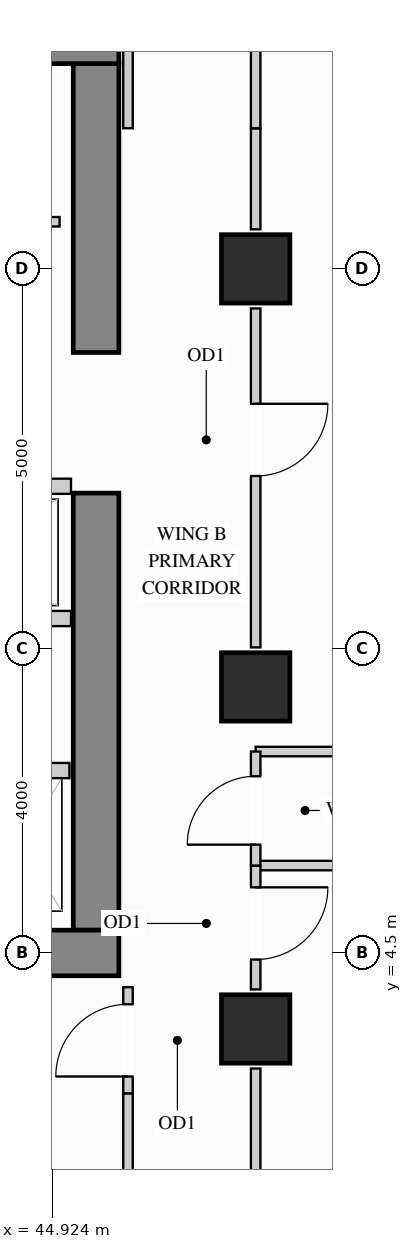
"""IFC4 building model, lengths in metres.
Left out: names, types, materials, properties, quantities, classifications, styles, units other than length and angle.
Written with IfcOpenShell. Run it as: python <this file> out.ifc"""

import sys

from ifc_helpers import new_model, si_unit, direction, frame, frame_2d, origin, origin_2d, place, context, subcontext, project, spatial, rectangle, extrude, source, transform, mapped, element, fill, save


model = new_model("IFC4")
c1 = context("Model", 3, precision=1e-05, world=origin(), true_north=direction((0.0, 1.0)))
c2 = subcontext(c1, "Body", "Model", "MODEL_VIEW")
j1 = project(units=[si_unit("LENGTHUNIT", "METRE"), si_unit("PLANEANGLEUNIT", "RADIAN")], contexts=[c1])
p1 = place(None, origin())
s1 = spatial("IfcSite", under=j1, at=p1, CompositionType="ELEMENT")
p2 = place(p1, origin())
s2 = spatial("IfcBuilding", under=s1, at=p2, CompositionType="ELEMENT")
p3 = place(p2, frame((0.0, 0.0, 150.3)))
s3 = spatial("IfcBuildingStorey", under=s2, at=p3, CompositionType="ELEMENT", Elevation=150.3)
m1 = source(origin(), c2, "Body", "SweptSolid", [
    extrude(rectangle(XDim=0.9, YDim=0.9, at=origin_2d()), origin(), (0.0, 0.0, 1.0), 3.4),
])
for number, where, z_axis, x_axis in (
    (1, (47.6, 13.5, 0.0), (0.0, 0.0, 1.0), (1.0, 0.0, 0.0)),
    (2, (47.6, 3.5, 0.0), (0.0, 0.0, 1.0), (1.0, 0.0, 0.0)),
    (3, (47.6, 8.0, 0.0), (0.0, 0.0, 1.0), (1.0, 0.0, 0.0)),
):
    element("IfcColumn", number, at=place(p3, frame(where, z_axis=z_axis, x_axis=x_axis)), inside=s3, PredefinedType="COLUMN", context=c2, shape_type="MappedRepresentation", body=[
        mapped(m1, transform((0.0, 0.0, 0.0), x_axis=(1.0, 0.0, 0.0), y_axis=(0.0, 1.0, 0.0), z_axis=(0.0, 0.0, 1.0))),
    ])
m2 = source(origin(), c2, "Body", "SweptSolid", [
    extrude(rectangle(XDim=5.75, YDim=0.6, at=frame_2d((2.875, 0.0))), origin(), (0.0, 0.0, 1.0), 3.4),
])
p4 = place(p3, frame((45.5, 4.8, 0.0), z_axis=(0.0, 0.0, 1.0), x_axis=(0.0, 1.0, 0.0)))
e4 = element("IfcWall", 4, at=p4, inside=s3, PredefinedType="SHEAR", context=c2, shape_type="MappedRepresentation", body=[
    mapped(m2, transform((0.0, 0.0, 0.0), x_axis=(1.0, 0.0, 0.0), y_axis=(0.0, 1.0, 0.0), z_axis=(0.0, 0.0, 1.0))),
])
m3 = source(origin(), c2, "Body", "SweptSolid", [
    extrude(rectangle(XDim=3.8, YDim=0.6, at=frame_2d((1.9, 0.0))), origin(), (0.0, 0.0, 1.0), 3.4),
])
p5 = place(p3, frame((45.5, 12.4, 0.0), z_axis=(0.0, 0.0, 1.0), x_axis=(0.0, 1.0, 0.0)))
e5 = element("IfcWall", 5, at=p5, inside=s3, PredefinedType="SHEAR", context=c2, shape_type="MappedRepresentation", body=[
    mapped(m3, transform((0.0, 0.0, 0.0), x_axis=(1.0, 0.0, 0.0), y_axis=(0.0, 1.0, 0.0), z_axis=(0.0, 0.0, 1.0))),
])
m4 = source(origin(), c2, "Body", "SweptSolid", [
    extrude(rectangle(XDim=10.1, YDim=0.6, at=frame_2d((5.05, 0.0))), origin(), (0.0, 0.0, 1.0), 3.4),
])
for number, where, z_axis, x_axis in (
    (6, (35.7, 16.5, 0.0), (0.0, 0.0, 1.0), (1.0, 0.0, 0.0)),
    (7, (35.7, 4.5, 0.0), (0.0, 0.0, 1.0), (1.0, 0.0, 0.0)),
):
    element("IfcWall", number, at=place(p3, frame(where, z_axis=z_axis, x_axis=x_axis)), inside=s3, PredefinedType="SHEAR", context=c2, shape_type="MappedRepresentation", body=[
        mapped(m4, transform((0.0, 0.0, 0.0), x_axis=(1.0, 0.0, 0.0), y_axis=(0.0, 1.0, 0.0), z_axis=(0.0, 0.0, 1.0))),
    ])
p6 = place(p3, frame((40.75, 14.12, 0.0), z_axis=(0.0, 0.0, 1.0), x_axis=(1.0, 0.0, 0.0)))
e8 = element("IfcWall", 8, at=p6, inside=s3, PredefinedType="PARTITIONING", context=c2, shape_type="SweptSolid", body=[
    extrude(rectangle(XDim=4.27, YDim=0.125, at=frame_2d((2.135, 0.0))), origin(), (0.0, 0.0, 1.0), 3.385),
])
p7 = place(p6, frame((1.66, 0.0, 0.0)))
e9 = element("IfcOpeningElement", 9, at=p7, cuts=e8, PredefinedType="OPENING", context=c2, shape_type="SweptSolid", body=[
    extrude(rectangle(XDim=0.95, YDim=2.15, at=frame_2d((0.475, 1.075))), frame((0.0, 0.073, 0.0), z_axis=(0.0, -1.0, 0.0), x_axis=(1.0, 0.0, 0.0)), (0.0, 0.0, 1.0), 0.145),
])
m5 = source(origin(), c2, "Body", "SweptSolid", [
    extrude(rectangle(XDim=5.048, YDim=0.125, at=frame_2d((2.524, 0.0))), origin(), (0.0, 0.0, 1.0), 3.385),
])
for number, where, z_axis, x_axis in (
    (10, (47.6, 5.65, 0.0), (0.0, 0.0, 1.0), (1.0, 0.0, 0.0)),
    (11, (47.6, 7.15, 0.0), (0.0, 0.0, 1.0), (1.0, 0.0, 0.0)),
):
    element("IfcWall", number, at=place(p3, frame(where, z_axis=z_axis, x_axis=x_axis)), inside=s3, PredefinedType="PARTITIONING", context=c2, shape_type="MappedRepresentation", body=[
        mapped(m5, transform((0.0, 0.0, 0.0), x_axis=(1.0, 0.0, 0.0), y_axis=(0.0, 1.0, 0.0), z_axis=(0.0, 0.0, 1.0))),
    ])
p8 = place(p3, frame((47.6, 4.02, 0.0), z_axis=(0.0, 0.0, 1.0), x_axis=(0.0, 1.0, 0.0)))
e12 = element("IfcWall", 12, at=p8, inside=s3, PredefinedType="PARTITIONING", context=c2, shape_type="SweptSolid", body=[
    extrude(rectangle(XDim=1.63, YDim=0.125, at=frame_2d((0.815, 0.0))), origin(), (0.0, 0.0, 1.0), 2.773),
])
p9 = place(p8, frame((0.393, 0.0, 0.0)))
e13 = element("IfcOpeningElement", 13, at=p9, cuts=e12, PredefinedType="OPENING", context=c2, shape_type="SweptSolid", body=[
    extrude(rectangle(XDim=0.95, YDim=2.15, at=frame_2d((0.475, 1.075))), frame((0.0, 0.073, 0.0), z_axis=(0.0, -1.0, 0.0), x_axis=(1.0, 0.0, 0.0)), (0.0, 0.0, 1.0), 0.145),
])
m6 = source(origin(), c2, "Body", "SweptSolid", [
    extrude(rectangle(XDim=1.86, YDim=0.125, at=frame_2d((0.93, 0.0))), origin(), (0.0, 0.0, 1.0), 2.773),
])
p10 = place(p3, frame((47.6, 1.12, 0.0), z_axis=(0.0, 0.0, 1.0), x_axis=(0.0, 1.0, 0.0)))
e14 = element("IfcWall", 14, at=p10, inside=s3, PredefinedType="PARTITIONING", context=c2, shape_type="MappedRepresentation", body=[
    mapped(m6, transform((0.0, 0.0, 0.0), x_axis=(1.0, 0.0, 0.0), y_axis=(0.0, 1.0, 0.0), z_axis=(0.0, 0.0, 1.0))),
])
p11 = place(p3, frame((47.6, 8.52, 0.0), z_axis=(0.0, 0.0, 1.0), x_axis=(0.0, 1.0, 0.0)))
e15 = element("IfcWall", 15, at=p11, inside=s3, PredefinedType="PARTITIONING", context=c2, shape_type="SweptSolid", body=[
    extrude(rectangle(XDim=4.46, YDim=0.125, at=frame_2d((2.23, 0.0))), origin(), (0.0, 0.0, 1.0), 2.773),
])
p12 = place(p11, frame((2.255, 0.0, 0.0)))
e16 = element("IfcOpeningElement", 16, at=p12, cuts=e15, PredefinedType="OPENING", context=c2, shape_type="SweptSolid", body=[
    extrude(rectangle(XDim=0.95, YDim=2.15, at=frame_2d((0.475, 1.075))), frame((0.0, 0.073, 0.0), z_axis=(0.0, -1.0, 0.0), x_axis=(1.0, 0.0, 0.0)), (0.0, 0.0, 1.0), 0.145),
])
m7 = source(origin(), c2, "Body", "SweptSolid", [
    extrude(rectangle(XDim=1.33, YDim=0.125, at=frame_2d((0.665, 0.0))), origin(), (0.0, 0.0, 1.0), 2.773),
])
p13 = place(p3, frame((47.6, 14.02, 0.0), z_axis=(0.0, 0.0, 1.0), x_axis=(0.0, 1.0, 0.0)))
e17 = element("IfcWall", 17, at=p13, inside=s3, PredefinedType="PARTITIONING", context=c2, shape_type="MappedRepresentation", body=[
    mapped(m7, transform((0.0, 0.0, 0.0), x_axis=(1.0, 0.0, 0.0), y_axis=(0.0, 1.0, 0.0), z_axis=(0.0, 0.0, 1.0))),
])
m8 = source(origin(), c2, "Body", "SweptSolid", [
    extrude(rectangle(XDim=1.53, YDim=0.125, at=frame_2d((0.765, 0.0))), origin(), (0.0, 0.0, 1.0), 2.773),
])
p14 = place(p3, frame((47.6, 15.35, 0.0), z_axis=(0.0, 0.0, 1.0), x_axis=(0.0, 1.0, 0.0)))
e18 = element("IfcWall", 18, at=p14, inside=s3, PredefinedType="PARTITIONING", context=c2, shape_type="MappedRepresentation", body=[
    mapped(m8, transform((0.0, 0.0, 0.0), x_axis=(1.0, 0.0, 0.0), y_axis=(0.0, 1.0, 0.0), z_axis=(0.0, 0.0, 1.0))),
])
p15 = place(p3, frame((47.6, 5.65, 0.0), z_axis=(0.0, 0.0, 1.0), x_axis=(0.0, 1.0, 0.0)))
e19 = element("IfcWall", 19, at=p15, inside=s3, PredefinedType="PARTITIONING", context=c2, shape_type="SweptSolid", body=[
    extrude(rectangle(XDim=1.5, YDim=0.125, at=frame_2d((0.75, 0.0))), origin(), (0.0, 0.0, 1.0), 2.773),
])
p16 = place(p15, frame((0.275, 0.0, 0.0)))
e20 = element("IfcOpeningElement", 20, at=p16, cuts=e19, PredefinedType="OPENING", context=c2, shape_type="SweptSolid", body=[
    extrude(rectangle(XDim=0.9, YDim=2.15, at=frame_2d((0.45, 1.075))), frame((0.0, 0.073, 0.0), z_axis=(0.0, -1.0, 0.0), x_axis=(1.0, 0.0, 0.0)), (0.0, 0.0, 1.0), 0.145),
])
m9 = source(origin(), c2, "Body", "SweptSolid", [
    extrude(rectangle(XDim=2.298, YDim=0.125, at=frame_2d((1.149, 0.0))), origin(), (0.0, 0.0, 1.0), 3.385),
])
p17 = place(p3, frame((45.92, 15.35, 0.0), z_axis=(0.0, 0.0, 1.0), x_axis=(0.0, 1.0, 0.0)))
e21 = element("IfcWall", 21, at=p17, inside=s3, PredefinedType="PARTITIONING", context=c2, shape_type="MappedRepresentation", body=[
    mapped(m9, transform((0.0, 0.0, 0.0), x_axis=(1.0, 0.0, 0.0), y_axis=(0.0, 1.0, 0.0), z_axis=(0.0, 0.0, 1.0))),
])
p18 = place(p3, frame((45.92, 2.65, 0.0), z_axis=(0.0, 0.0, 1.0), x_axis=(0.0, 1.0, 0.0)))
e22 = element("IfcWall", 22, at=p18, inside=s3, PredefinedType="PARTITIONING", context=c2, shape_type="SweptSolid", body=[
    extrude(rectangle(XDim=1.4, YDim=0.125, at=frame_2d((0.7, 0.0))), origin(), (0.0, 0.0, 1.0), 3.385),
])
p19 = place(p18, frame((0.225, 0.0, 0.0)))
e23 = element("IfcOpeningElement", 23, at=p19, cuts=e22, PredefinedType="OPENING", context=c2, shape_type="SweptSolid", body=[
    extrude(rectangle(XDim=0.95, YDim=2.15, at=frame_2d((0.475, 1.075))), frame((0.0, 0.073, 0.0), z_axis=(0.0, -1.0, 0.0), x_axis=(1.0, 0.0, 0.0)), (0.0, 0.0, 1.0), 0.145),
])
p20 = place(p3, frame((45.92, 0.352, 0.0), z_axis=(0.0, 0.0, 1.0), x_axis=(0.0, 1.0, 0.0)))
e24 = element("IfcWall", 24, at=p20, inside=s3, PredefinedType="PARTITIONING", context=c2, shape_type="MappedRepresentation", body=[
    mapped(m9, transform((0.0, 0.0, 0.0), x_axis=(1.0, 0.0, 0.0), y_axis=(0.0, 1.0, 0.0), z_axis=(0.0, 0.0, 1.0))),
])
m10 = source(origin(), c2, "Body", "SweptSolid", [
    extrude(rectangle(XDim=1.3, YDim=0.2, at=frame_2d((0.65, 0.0))), origin(), (0.0, 0.0, 1.0), 3.385),
])
p21 = place(p3, frame((43.85, 6.9, 0.0), z_axis=(0.0, 0.0, 1.0), x_axis=(1.0, 0.0, 0.0)))
e25 = element("IfcWall", 25, at=p21, inside=s3, PredefinedType="PARTITIONING", context=c2, shape_type="MappedRepresentation", body=[
    mapped(m10, transform((0.0, 0.0, 0.0), x_axis=(1.0, 0.0, 0.0), y_axis=(0.0, 1.0, 0.0), z_axis=(0.0, 0.0, 1.0))),
])
m11 = source(origin(), c2, "Body", "SweptSolid", [
    extrude(rectangle(XDim=3.49, YDim=0.2, at=frame_2d((1.745, 0.0))), origin(), (0.0, 0.0, 1.0), 3.385),
])
for number, where, z_axis, x_axis in (
    (26, (41.68, 10.64, 0.0), (0.0, 0.0, 1.0), (1.0, 0.0, 0.0)),
    (27, (41.68, 8.9, 0.0), (0.0, 0.0, 1.0), (1.0, 0.0, 0.0)),
):
    element("IfcWall", number, at=place(p3, frame(where, z_axis=z_axis, x_axis=x_axis)), inside=s3, PredefinedType="PARTITIONING", context=c2, shape_type="MappedRepresentation", body=[
        mapped(m11, transform((0.0, 0.0, 0.0), x_axis=(1.0, 0.0, 0.0), y_axis=(0.0, 1.0, 0.0), z_axis=(0.0, 0.0, 1.0))),
    ])
m12 = source(origin(), c2, "Body", "SweptSolid", [
    extrude(rectangle(XDim=0.95, YDim=2.15, at=frame_2d((0.475, 1.075))), frame((0.0, 0.025, 0.0), z_axis=(0.0, -1.0, 0.0), x_axis=(1.0, 0.0, 0.0)), (0.0, 0.0, 1.0), 0.05),
])
p22 = place(p19, origin())
e28 = element("IfcDoor", 28, at=p22, inside=s3, OperationType="SINGLE_SWING_LEFT", PredefinedType="DOOR", context=c2, shape_type="MappedRepresentation", body=[
    mapped(m12, transform((0.0, 0.0, 0.0), x_axis=(1.0, 0.0, 0.0), y_axis=(0.0, 1.0, 0.0), z_axis=(0.0, 0.0, 1.0))),
])
fill(e23, e28)
p23 = place(p9, origin())
e29 = element("IfcDoor", 29, at=p23, inside=s3, OperationType="SINGLE_SWING_RIGHT", PredefinedType="DOOR", context=c2, shape_type="MappedRepresentation", body=[
    mapped(m12, transform((0.0, 0.0, 0.0), x_axis=(1.0, 0.0, 0.0), y_axis=(0.0, 1.0, 0.0), z_axis=(0.0, 0.0, 1.0))),
])
fill(e13, e29)
p24 = place(p12, origin())
e30 = element("IfcDoor", 30, at=p24, inside=s3, OperationType="SINGLE_SWING_RIGHT", PredefinedType="DOOR", context=c2, shape_type="MappedRepresentation", body=[
    mapped(m12, transform((0.0, 0.0, 0.0), x_axis=(1.0, 0.0, 0.0), y_axis=(0.0, 1.0, 0.0), z_axis=(0.0, 0.0, 1.0))),
])
fill(e16, e30)
m13 = source(origin(), c2, "Body", "SweptSolid", [
    extrude(rectangle(XDim=0.9, YDim=2.15, at=frame_2d((0.45, 1.075))), frame((0.0, 0.025, 0.0), z_axis=(0.0, -1.0, 0.0), x_axis=(1.0, 0.0, 0.0)), (0.0, 0.0, 1.0), 0.05),
])
p25 = place(p16, origin())
e31 = element("IfcDoor", 31, at=p25, inside=s3, OperationType="SINGLE_SWING_LEFT", PredefinedType="DOOR", context=c2, shape_type="MappedRepresentation", body=[
    mapped(m13, transform((0.0, 0.0, 0.0), x_axis=(1.0, 0.0, 0.0), y_axis=(0.0, 1.0, 0.0), z_axis=(0.0, 0.0, 1.0))),
])
fill(e20, e31)
save(model, sys.argv[1])
